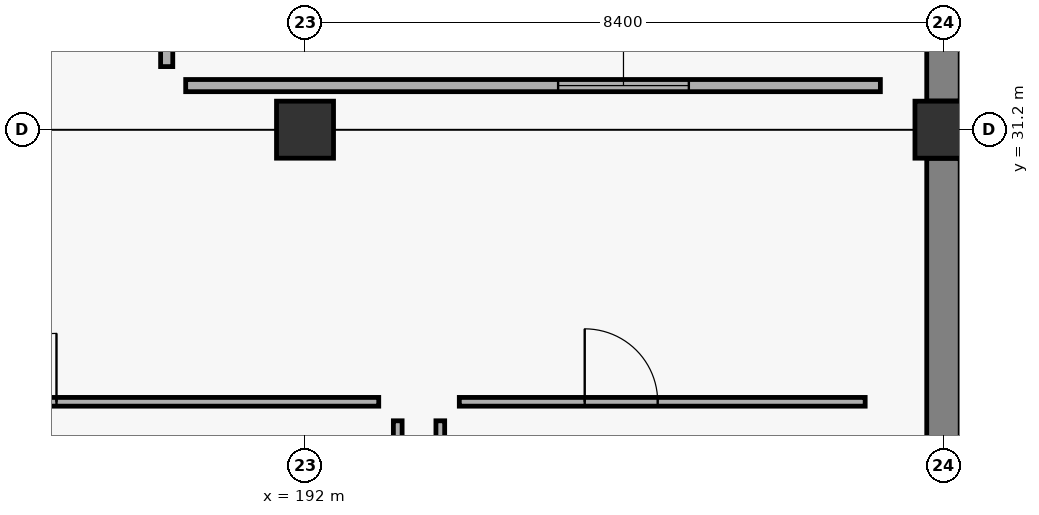
"""IFC4 building model, lengths in metres.
Left out: names, types, materials, properties, quantities, classifications, styles, units other than length and angle.
Written with IfcOpenShell. Run it as: python <this file> out.ifc"""

import sys

from ifc_helpers import new_model, si_unit, direction, frame, frame_2d, origin, origin_2d, place, context, subcontext, project, spatial, rectangle, extrude, element, fill, save


model = new_model("IFC4")
c1 = context("Model", 3, precision=1e-05, world=origin(), true_north=direction((0.0, 1.0)))
c2 = subcontext(c1, "Body", "Model", "MODEL_VIEW")
j1 = project(units=[si_unit("LENGTHUNIT", "METRE"), si_unit("PLANEANGLEUNIT", "RADIAN")], contexts=[c1])
p1 = place(None, origin())
s1 = spatial("IfcSite", under=j1, at=p1, CompositionType="ELEMENT")
p2 = place(p1, origin())
s2 = spatial("IfcBuilding", under=s1, at=p2, CompositionType="ELEMENT")
p3 = place(p2, frame((0.0, 0.0, 15.6)))
s3 = spatial("IfcBuildingStorey", under=s2, at=p3, CompositionType="ELEMENT", Elevation=15.6)
for number, where, z_axis, x_axis in (
    (1, (192.0, 31.2, 0.0), (0.0, 0.0, 1.0), (1.0, 0.0, 0.0)),
    (2, (200.4, 31.2, 0.0), (0.0, 0.0, 1.0), (1.0, 0.0, 0.0)),
):
    element("IfcColumn", number, at=place(p3, frame(where, z_axis=z_axis, x_axis=x_axis)), inside=s3, PredefinedType="COLUMN", context=c2, shape_type="SweptSolid", body=[
        extrude(rectangle(XDim=0.75, YDim=0.75, at=origin_2d()), origin(), (0.0, 0.0, 1.0), 5.1),
    ])
p4 = place(p3, frame((200.4, 21.977, 0.0), z_axis=(0.0, 0.0, 1.0), x_axis=(0.0, 1.0, 0.0)))
e3 = element("IfcWall", 3, at=p4, inside=s3, PredefinedType="SOLIDWALL", context=c2, shape_type="SweptSolid", body=[
    extrude(rectangle(XDim=8.846, YDim=0.44, at=frame_2d((4.423, 0.0))), origin(), (0.0, 0.0, 1.0), 4.31),
])
p5 = place(p3, frame((200.4, 31.577, 0.0), z_axis=(0.0, 0.0, 1.0), x_axis=(0.0, 1.0, 0.0)))
e4 = element("IfcWall", 4, at=p5, inside=s3, PredefinedType="SOLIDWALL", context=c2, shape_type="SweptSolid", body=[
    extrude(rectangle(XDim=8.846, YDim=0.44, at=frame_2d((4.423, 0.0))), origin(), (0.0, 0.0, 1.0), 4.31),
])
p6 = place(p3, frame((190.18, 32.03, 0.0), z_axis=(0.0, 0.0, 1.0), x_axis=(0.0, 1.0, 0.0)))
e5 = element("IfcWall", 5, at=p6, inside=s3, PredefinedType="PARTITIONING", context=c2, shape_type="SweptSolid", body=[
    extrude(rectangle(XDim=26.14, YDim=0.16, at=frame_2d((13.07, 0.0))), origin(), (0.0, 0.0, 1.0), 4.11),
])
p7 = place(p6, frame((3.4, 0.0, 0.0)))
e6 = element("IfcOpeningElement", 6, at=p7, cuts=e5, PredefinedType="OPENING", context=c2, shape_type="SweptSolid", body=[
    extrude(rectangle(XDim=1.0, YDim=2.16, at=frame_2d((0.5, 1.08))), frame((0.0, 0.09, 0.0), z_axis=(0.0, -1.0, 0.0), x_axis=(1.0, 0.0, 0.0)), (0.0, 0.0, 1.0), 0.18),
])
p8 = place(p3, frame((190.43, 31.78, 0.0), z_axis=(0.0, 0.0, 1.0), x_axis=(1.0, 0.0, 0.0)))
e7 = element("IfcWall", 7, at=p8, inside=s3, PredefinedType="PARTITIONING", context=c2, shape_type="SweptSolid", body=[
    extrude(rectangle(XDim=9.14, YDim=0.16, at=frame_2d((4.57, 0.0))), origin(), (0.0, 0.0, 1.0), 4.44),
])
p9 = place(p8, frame((4.9, 0.0, 0.9)))
e8 = element("IfcOpeningElement", 8, at=p9, cuts=e7, PredefinedType="OPENING", context=c2, shape_type="SweptSolid", body=[
    extrude(rectangle(XDim=1.72, YDim=1.46, at=frame_2d((0.86, 0.73))), frame((0.0, 0.09, 0.0), z_axis=(0.0, -1.0, 0.0), x_axis=(1.0, 0.0, 0.0)), (0.0, 0.0, 1.0), 0.18),
])
p10 = place(p3, frame((187.43, 27.62, 0.0), z_axis=(0.0, 0.0, 1.0), x_axis=(1.0, 0.0, 0.0)))
e9 = element("IfcWall", 9, at=p10, inside=s3, PredefinedType="PARTITIONING", context=c2, shape_type="SweptSolid", body=[
    extrude(rectangle(XDim=5.54, YDim=0.115, at=frame_2d((2.77, 0.0))), origin(), (0.0, 0.0, 1.0), 4.38),
])
p11 = place(p10, frame((0.4, 0.0, 0.0)))
e10 = element("IfcOpeningElement", 10, at=p11, cuts=e9, PredefinedType="OPENING", context=c2, shape_type="SweptSolid", body=[
    extrude(rectangle(XDim=0.9, YDim=2.1, at=frame_2d((0.45, 1.05))), frame((0.0, 0.067, 0.0), z_axis=(0.0, -1.0, 0.0), x_axis=(1.0, 0.0, 0.0)), (0.0, 0.0, 1.0), 0.135),
])
p12 = place(p3, frame((193.22, 14.03, 0.0), z_axis=(0.0, 0.0, 1.0), x_axis=(0.0, 1.0, 0.0)))
e11 = element("IfcWall", 11, at=p12, inside=s3, PredefinedType="PARTITIONING", context=c2, shape_type="SweptSolid", body=[
    extrude(rectangle(XDim=13.34, YDim=0.115, at=frame_2d((6.67, 0.0))), origin(), (0.0, 0.0, 1.0), 4.11),
])
p13 = place(p12, frame((11.36, 0.0, 0.9)))
e12 = element("IfcOpeningElement", 12, at=p13, cuts=e11, PredefinedType="OPENING", context=c2, shape_type="SweptSolid", body=[
    extrude(rectangle(XDim=1.58, YDim=1.24, at=frame_2d((0.79, 0.62))), frame((0.0, 0.067, 0.0), z_axis=(0.0, -1.0, 0.0), x_axis=(1.0, 0.0, 0.0)), (0.0, 0.0, 1.0), 0.135),
])
p14 = place(p3, frame((194.03, 27.62, 0.0), z_axis=(0.0, 0.0, 1.0), x_axis=(1.0, 0.0, 0.0)))
e13 = element("IfcWall", 13, at=p14, inside=s3, PredefinedType="PARTITIONING", context=c2, shape_type="SweptSolid", body=[
    extrude(rectangle(XDim=5.34, YDim=0.115, at=frame_2d((2.67, 0.0))), origin(), (0.0, 0.0, 1.0), 4.38),
])
p15 = place(p14, frame((1.65, 0.0, 0.0)))
e14 = element("IfcOpeningElement", 14, at=p15, cuts=e13, PredefinedType="OPENING", context=c2, shape_type="SweptSolid", body=[
    extrude(rectangle(XDim=0.96, YDim=2.14, at=frame_2d((0.48, 1.07))), frame((0.0, 0.067, 0.0), z_axis=(0.0, -1.0, 0.0), x_axis=(1.0, 0.0, 0.0)), (0.0, 0.0, 1.0), 0.135),
])
p16 = place(p3, frame((193.78, 14.03, 0.0), z_axis=(0.0, 0.0, 1.0), x_axis=(0.0, 1.0, 0.0)))
e15 = element("IfcWall", 15, at=p16, inside=s3, PredefinedType="PARTITIONING", context=c2, shape_type="SweptSolid", body=[
    extrude(rectangle(XDim=13.34, YDim=0.115, at=frame_2d((6.67, 0.0))), origin(), (0.0, 0.0, 1.0), 4.11),
])
p17 = place(p16, frame((10.9, 0.0, 0.9)))
e16 = element("IfcOpeningElement", 16, at=p17, cuts=e15, PredefinedType="OPENING", context=c2, shape_type="SweptSolid", body=[
    extrude(rectangle(XDim=2.02, YDim=1.32, at=frame_2d((1.01, 0.66))), frame((0.0, 0.067, 0.0), z_axis=(0.0, -1.0, 0.0), x_axis=(1.0, 0.0, 0.0)), (0.0, 0.0, 1.0), 0.135),
])
p18 = place(p9, origin())
e17 = element("IfcWindow", 17, at=p18, inside=s3, PartitioningType="SINGLE_PANEL", PredefinedType="WINDOW", context=c2, shape_type="SweptSolid", body=[
    extrude(rectangle(XDim=1.72, YDim=1.46, at=frame_2d((0.86, 0.73))), frame((0.0, 0.03, 0.0), z_axis=(0.0, -1.0, 0.0), x_axis=(1.0, 0.0, 0.0)), (0.0, 0.0, 1.0), 0.06),
])
fill(e8, e17)
p19 = place(p11, origin())
e18 = element("IfcDoor", 18, at=p19, inside=s3, OperationType="SINGLE_SWING_RIGHT", PredefinedType="DOOR", context=c2, shape_type="SweptSolid", body=[
    extrude(rectangle(XDim=0.9, YDim=2.1, at=frame_2d((0.45, 1.05))), frame((0.0, 0.025, 0.0), z_axis=(0.0, -1.0, 0.0), x_axis=(1.0, 0.0, 0.0)), (0.0, 0.0, 1.0), 0.05),
])
fill(e10, e18)
p20 = place(p15, origin())
e19 = element("IfcDoor", 19, at=p20, inside=s3, OperationType="SINGLE_SWING_LEFT", PredefinedType="DOOR", context=c2, shape_type="SweptSolid", body=[
    extrude(rectangle(XDim=0.96, YDim=2.14, at=frame_2d((0.48, 1.07))), frame((0.0, 0.025, 0.0), z_axis=(0.0, -1.0, 0.0), x_axis=(1.0, 0.0, 0.0)), (0.0, 0.0, 1.0), 0.05),
])
fill(e14, e19)
save(model, sys.argv[1])
